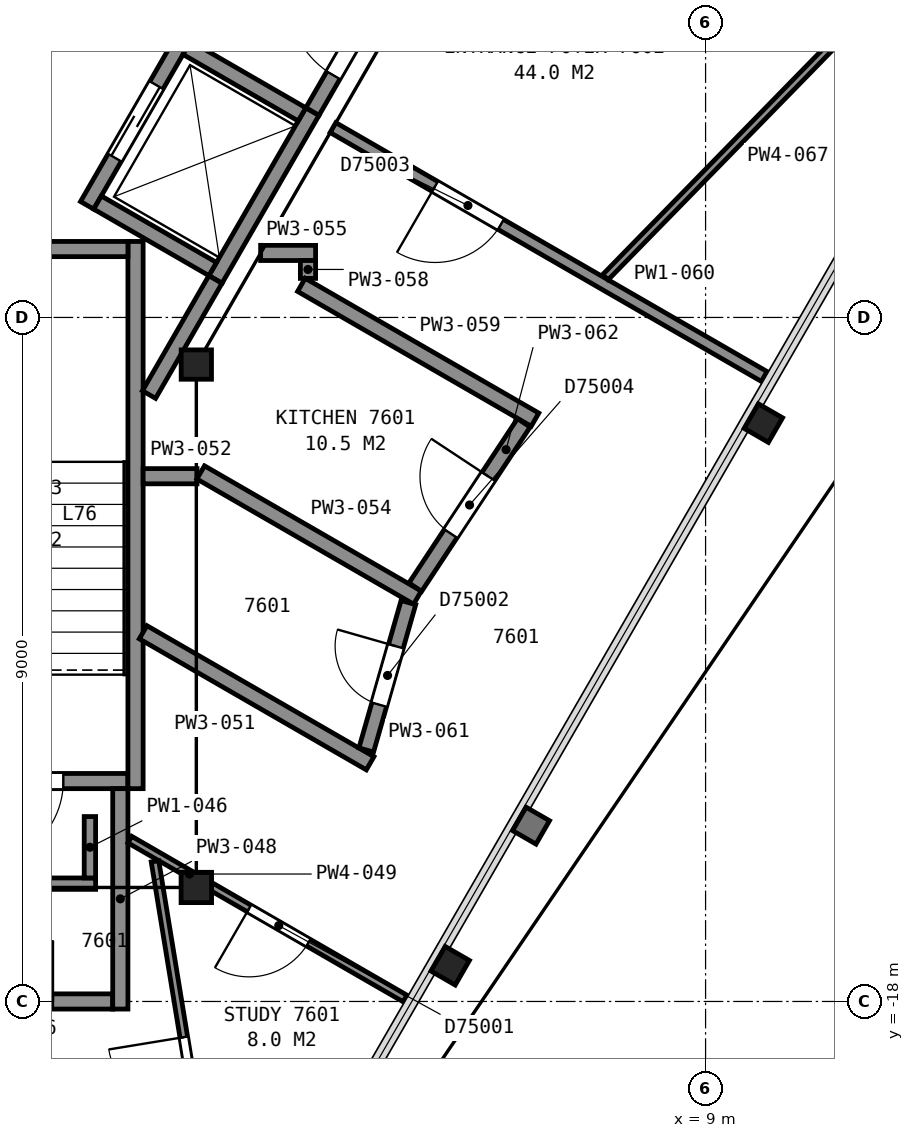
"""IFC4 building model, lengths in metres.
Left out: names, types, materials, properties, quantities, classifications, styles, units other than length and angle.
Written with IfcOpenShell. Run it as: python <this file> out.ifc"""

import sys

from ifc_helpers import new_model, si_unit, direction, frame, frame_2d, origin, origin_2d, place, context, subcontext, project, spatial, rectangle, i_section, extrude, element, fill, save


model = new_model("IFC4")
c1 = context("Model", 3, precision=1e-05, world=origin(), true_north=direction((0.0, 1.0)))
c2 = subcontext(c1, "Body", "Model", "MODEL_VIEW")
j1 = project(units=[si_unit("LENGTHUNIT", "METRE"), si_unit("PLANEANGLEUNIT", "RADIAN")], contexts=[c1])
p1 = place(None, origin())
s1 = spatial("IfcSite", under=j1, at=p1, CompositionType="ELEMENT")
p2 = place(p1, origin())
s2 = spatial("IfcBuilding", under=s1, at=p2, CompositionType="ELEMENT")
p3 = place(p2, frame((0.0, 0.0, 301.0)))
s3 = spatial("IfcBuildingStorey", under=s2, at=p3, CompositionType="ELEMENT", Elevation=301.0)
p4 = place(p3, frame((5.64, -17.53, 0.0), z_axis=(0.0, 0.0, 1.0), x_axis=(-0.5, -0.866025403784, 0.0)))
e1 = element("IfcColumn", 1, at=p4, inside=s3, PredefinedType="COLUMN", context=c2, shape_type="SweptSolid", body=[
    extrude(i_section(OverallWidth=0.373, OverallDepth=0.368, WebThickness=0.015, FlangeThickness=0.024, FilletRadius=0.015, at=origin_2d()), origin(), (0.0, 0.0, 1.0), 3.645),
])
p5 = place(p3, frame((9.76, -10.39, 0.0), z_axis=(0.0, 0.0, 1.0), x_axis=(-0.5, -0.866025403784, 0.0)))
e2 = element("IfcColumn", 2, at=p5, inside=s3, PredefinedType="COLUMN", context=c2, shape_type="SweptSolid", body=[
    extrude(i_section(OverallWidth=0.373, OverallDepth=0.368, WebThickness=0.015, FlangeThickness=0.024, FilletRadius=0.015, at=origin_2d()), origin(), (0.0, 0.0, 1.0), 3.655),
])
p6 = place(p3, frame((2.3, -16.5, 0.0), z_axis=(0.0, 0.0, 1.0), x_axis=(-1.0, 0.0, 0.0)))
e3 = element("IfcColumn", 3, at=p6, inside=s3, PredefinedType="COLUMN", context=c2, shape_type="SweptSolid", body=[
    extrude(i_section(OverallWidth=0.401, OverallDepth=0.399, WebThickness=0.025, FlangeThickness=0.04, FilletRadius=0.015, at=origin_2d()), origin(), (0.0, 0.0, 1.0), 3.7),
])
p7 = place(p3, frame((2.3, -9.62, 0.0), z_axis=(0.0, 0.0, 1.0), x_axis=(1.0, 0.0, 0.0)))
e4 = element("IfcColumn", 4, at=p7, inside=s3, PredefinedType="COLUMN", context=c2, shape_type="SweptSolid", body=[
    extrude(i_section(OverallWidth=0.399, OverallDepth=0.386, WebThickness=0.021, FlangeThickness=0.033, FilletRadius=0.015, at=origin_2d()), origin(), (0.0, 0.0, 1.0), 3.7),
])
p8 = place(p3, frame((-1.4, -15.1, 0.0), z_axis=(0.0, 0.0, 1.0), x_axis=(1.0, 0.0, 0.0)))
e5 = element("IfcWall", 5, at=p8, inside=s3, PredefinedType="PARTITIONING", context=c2, shape_type="SweptSolid", body=[
    extrude(rectangle(XDim=2.8, YDim=0.2, at=frame_2d((1.4, 0.0))), origin(), (0.0, 0.0, 1.0), 3.45),
])
p9 = place(p8, frame((0.85, 0.0, 0.0)))
e6 = element("IfcOpeningElement", 6, at=p9, cuts=e5, PredefinedType="OPENING", context=c2, shape_type="SweptSolid", body=[
    extrude(rectangle(XDim=1.1, YDim=2.1, at=frame_2d((0.55, 1.05))), frame((0.0, 0.11, 0.0), z_axis=(0.0, -1.0, 0.0), x_axis=(1.0, 0.0, 0.0)), (0.0, 0.0, 1.0), 0.22),
])
p10 = place(p3, frame((1.5, -8.0, 0.0), z_axis=(0.0, 0.0, 1.0), x_axis=(0.0, -1.0, 0.0)))
e7 = element("IfcWall", 7, at=p10, inside=s3, PredefinedType="PARTITIONING", context=c2, shape_type="SweptSolid", body=[
    extrude(rectangle(XDim=7.2, YDim=0.2, at=frame_2d((3.6, 0.0))), origin(), (0.0, 0.0, 1.0), 3.45),
])
p11 = place(p3, frame((-1.4, -8.1, 0.0), z_axis=(0.0, 0.0, 1.0), x_axis=(1.0, 0.0, 0.0)))
e8 = element("IfcWall", 8, at=p11, inside=s3, PredefinedType="PARTITIONING", context=c2, shape_type="SweptSolid", body=[
    extrude(rectangle(XDim=2.8, YDim=0.2, at=frame_2d((1.4, 0.0))), origin(), (0.0, 0.0, 1.0), 3.45),
])
p12 = place(p3, frame((2.552, -8.5, 0.0), z_axis=(0.0, 0.0, 1.0), x_axis=(0.499990435942, 0.866030925526, 0.0)))
e9 = element("IfcWall", 9, at=p12, inside=s3, PredefinedType="PARTITIONING", context=c2, shape_type="SweptSolid", body=[
    extrude(rectangle(XDim=2.55, YDim=0.2, at=frame_2d((1.275, 0.0))), origin(), (0.0, 0.0, 1.0), 3.7),
])
p13 = place(p3, frame((0.863, -7.525, 0.0), z_axis=(0.0, 0.0, 1.0), x_axis=(0.499990435942, 0.866030925526, 0.0)))
e10 = element("IfcWall", 10, at=p13, inside=s3, PredefinedType="PARTITIONING", context=c2, shape_type="SweptSolid", body=[
    extrude(rectangle(XDim=2.55, YDim=0.2, at=frame_2d((1.275, 0.0))), origin(), (0.0, 0.0, 1.0), 3.7),
])
p14 = place(p13, frame((0.725, 0.0, 0.0)))
e11 = element("IfcOpeningElement", 11, at=p14, cuts=e10, PredefinedType="OPENING", context=c2, shape_type="SweptSolid", body=[
    extrude(rectangle(XDim=1.1, YDim=2.1, at=frame_2d((0.55, 1.05))), frame((0.0, 0.11, 0.0), z_axis=(0.0, -1.0, 0.0), x_axis=(1.0, 0.0, 0.0)), (0.0, 0.0, 1.0), 0.22),
])
for number, where, z_axis, x_axis in (
    (12, (3.69, -6.328, 0.0), (0.0, 0.0, 1.0), (-0.866, 0.5, 0.0)),
    (13, (2.515, -8.363, 0.0), (0.0, 0.0, 1.0), (-0.866, 0.5, 0.0)),
):
    element("IfcWall", number, at=place(p3, frame(where, z_axis=z_axis, x_axis=x_axis)), inside=s3, PredefinedType="PARTITIONING", context=c2, shape_type="SweptSolid", body=[
        extrude(rectangle(XDim=1.75, YDim=0.2, at=frame_2d((0.875, 0.0))), origin(), (0.0, 0.0, 1.0), 3.7),
    ])
p15 = place(p3, frame((1.677, -10.015, 0.0), z_axis=(0.0, 0.0, 1.0), x_axis=(0.49983532306, 0.866120459187, 0.0)))
e14 = element("IfcWall", 14, at=p15, inside=s3, PredefinedType="PARTITIONING", context=c2, shape_type="SweptSolid", body=[
    extrude(rectangle(XDim=1.748, YDim=0.2, at=frame_2d((0.874, 0.0))), origin(), (0.0, 0.0, 1.0), 3.45),
])
p16 = place(p3, frame((3.828, -6.29, 0.0), z_axis=(0.0, 0.0, 1.0), x_axis=(0.499979739078, 0.866037101117, 0.0)))
e15 = element("IfcWall", 15, at=p16, inside=s3, PredefinedType="PARTITIONING", context=c2, shape_type="SweptSolid", body=[
    extrude(rectangle(XDim=11.363, YDim=0.2, at=frame_2d((5.681, 0.0))), origin(), (0.0, 0.0, 1.0), 3.45),
])
p17 = place(p16, frame((0.55, 0.0, 0.0)))
e16 = element("IfcOpeningElement", 16, at=p17, cuts=e15, PredefinedType="OPENING", context=c2, shape_type="SweptSolid", body=[
    extrude(rectangle(XDim=1.2, YDim=2.1, at=frame_2d((0.6, 1.05))), frame((0.0, 0.11, 0.0), z_axis=(0.0, -1.0, 0.0), x_axis=(1.0, 0.0, 0.0)), (0.0, 0.0, 1.0), 0.22),
])
p18 = place(p3, frame((-1.37, -16.45, 0.0), z_axis=(0.0, 0.0, 1.0), x_axis=(1.0, 0.0, 0.0)))
e17 = element("IfcWall", 17, at=p18, inside=s3, PredefinedType="PARTITIONING", context=c2, shape_type="SweptSolid", body=[
    extrude(rectangle(XDim=2.345, YDim=0.15, at=frame_2d((1.173, 0.0))), origin(), (0.0, 0.0, 1.0), 2.723),
])
p19 = place(p3, frame((-1.211, -18.0, 0.0), z_axis=(0.0, 0.0, 1.0), x_axis=(1.0, 0.0, 0.0)))
e18 = element("IfcWall", 18, at=p19, inside=s3, PredefinedType="PARTITIONING", context=c2, shape_type="SweptSolid", body=[
    extrude(rectangle(XDim=2.411, YDim=0.2, at=frame_2d((1.206, 0.0))), origin(), (0.0, 0.0, 1.0), 2.723),
])
p20 = place(p19, frame((0.825, 0.0, 0.0)))
e19 = element("IfcOpeningElement", 19, at=p20, cuts=e18, PredefinedType="OPENING", context=c2, shape_type="SweptSolid", body=[
    extrude(rectangle(XDim=0.8, YDim=2.1, at=frame_2d((0.4, 1.05))), frame((0.0, 0.11, 0.0), z_axis=(0.0, -1.0, 0.0), x_axis=(1.0, 0.0, 0.0)), (0.0, 0.0, 1.0), 0.22),
])
p21 = place(p3, frame((0.9, -16.375, 0.0), z_axis=(0.0, 0.0, 1.0), x_axis=(0.0, 1.0, 0.0)))
e20 = element("IfcWall", 20, at=p21, inside=s3, PredefinedType="PARTITIONING", context=c2, shape_type="SweptSolid", body=[
    extrude(rectangle(XDim=0.808, YDim=0.15, at=frame_2d((0.404, 0.0))), origin(), (0.0, 0.0, 1.0), 2.723),
])
p22 = place(p3, frame((1.3, -18.1, 0.0), z_axis=(0.0, 0.0, 1.0), x_axis=(0.0, 1.0, 0.0)))
e21 = element("IfcWall", 21, at=p22, inside=s3, PredefinedType="PARTITIONING", context=c2, shape_type="SweptSolid", body=[
    extrude(rectangle(XDim=2.9, YDim=0.2, at=frame_2d((1.45, 0.0))), origin(), (0.0, 0.0, 1.0), 2.723),
])
p23 = place(p3, frame((5.047, -17.961, 0.0), z_axis=(0.0, 0.0, 1.0), x_axis=(-0.866050460131, 0.499956598623, 0.0)))
e22 = element("IfcWall", 22, at=p23, inside=s3, PredefinedType="PARTITIONING", context=c2, shape_type="SweptSolid", body=[
    extrude(rectangle(XDim=4.182, YDim=0.1, at=frame_2d((2.091, 0.0))), origin(), (0.0, 0.0, 1.0), 2.723),
])
p24 = place(p23, frame((1.469, 0.0, 0.0)))
e23 = element("IfcOpeningElement", 23, at=p24, cuts=e22, PredefinedType="OPENING", context=c2, shape_type="SweptSolid", body=[
    extrude(rectangle(XDim=0.9, YDim=2.1, at=frame_2d((0.45, 1.05))), frame((0.0, 0.06, 0.0), z_axis=(0.0, -1.0, 0.0), x_axis=(1.0, 0.0, 0.0)), (0.0, 0.0, 1.0), 0.12),
])
p25 = place(p3, frame((1.6, -13.142, 0.0), z_axis=(0.0, 0.0, 1.0), x_axis=(0.866078307516, -0.499908356852, 0.0)))
e24 = element("IfcWall", 24, at=p25, inside=s3, PredefinedType="PARTITIONING", context=c2, shape_type="SweptSolid", body=[
    extrude(rectangle(XDim=3.448, YDim=0.2, at=frame_2d((1.724, 0.0))), origin(), (0.0, 0.0, 1.0), 2.723),
])
p26 = place(p3, frame((1.6, -11.089, 0.0), z_axis=(0.0, 0.0, 1.0), x_axis=(1.0, 0.0, 0.0)))
e25 = element("IfcWall", 25, at=p26, inside=s3, PredefinedType="PARTITIONING", context=c2, shape_type="SweptSolid", body=[
    extrude(rectangle(XDim=0.709, YDim=0.2, at=frame_2d((0.354, 0.0))), origin(), (0.0, 0.0, 1.0), 2.723),
])
p27 = place(p3, frame((2.721, -22.048, 0.0), z_axis=(0.0, 0.0, 1.0), x_axis=(-0.161659467857, 0.98684660229, 0.0)))
e26 = element("IfcWall", 26, at=p27, inside=s3, PredefinedType="PARTITIONING", context=c2, shape_type="SweptSolid", body=[
    extrude(rectangle(XDim=5.97, YDim=0.1, at=frame_2d((2.985, 0.0))), origin(), (0.0, 0.0, 1.0), 2.723),
])
p28 = place(p27, frame((2.625, 0.0, 0.0)))
e27 = element("IfcOpeningElement", 27, at=p28, cuts=e26, PredefinedType="OPENING", context=c2, shape_type="SweptSolid", body=[
    extrude(rectangle(XDim=1.0, YDim=2.1, at=frame_2d((0.5, 1.05))), frame((0.0, 0.06, 0.0), z_axis=(0.0, -1.0, 0.0), x_axis=(1.0, 0.0, 0.0)), (0.0, 0.0, 1.0), 0.12),
])
p29 = place(p3, frame((2.357, -11.039, 0.0), z_axis=(0.0, 0.0, 1.0), x_axis=(0.865999185644, -0.500045408402, 0.0)))
e28 = element("IfcWall", 28, at=p29, inside=s3, PredefinedType="PARTITIONING", context=c2, shape_type="SweptSolid", body=[
    extrude(rectangle(XDim=3.294, YDim=0.2, at=frame_2d((1.647, 0.0))), origin(), (0.0, 0.0, 1.0), 2.723),
])
p30 = place(p3, frame((3.146, -8.151, 0.0), z_axis=(0.0, 0.0, 1.0), x_axis=(1.0, 0.0, 0.0)))
e29 = element("IfcWall", 29, at=p30, inside=s3, PredefinedType="PARTITIONING", context=c2, shape_type="SweptSolid", body=[
    extrude(rectangle(XDim=0.723, YDim=0.2, at=frame_2d((0.361, 0.0))), origin(), (0.0, 0.0, 1.0), 2.723),
])
p31 = place(p3, frame((3.769, -8.486, 0.0), z_axis=(0.0, 0.0, 1.0), x_axis=(0.0, 1.0, 0.0)))
e30 = element("IfcWall", 30, at=p31, inside=s3, PredefinedType="PARTITIONING", context=c2, shape_type="SweptSolid", body=[
    extrude(rectangle(XDim=0.235, YDim=0.2, at=frame_2d((0.118, 0.0))), origin(), (0.0, 0.0, 1.0), 2.723),
])
p32 = place(p3, frame((3.682, -8.571, 0.0), z_axis=(0.0, 0.0, 1.0), x_axis=(0.866075604562, -0.499913039621, 0.0)))
e31 = element("IfcWall", 31, at=p32, inside=s3, PredefinedType="PARTITIONING", context=c2, shape_type="SweptSolid", body=[
    extrude(rectangle(XDim=3.549, YDim=0.2, at=frame_2d((1.774, 0.0))), origin(), (0.0, 0.0, 1.0), 2.723),
])
p33 = place(p3, frame((9.772, -9.777, 0.0), z_axis=(0.0, 0.0, 1.0), x_axis=(-0.866083818164, 0.499898809675, 0.0)))
e32 = element("IfcWall", 32, at=p33, inside=s3, PredefinedType="PARTITIONING", context=c2, shape_type="SweptSolid", body=[
    extrude(rectangle(XDim=6.551, YDim=0.15, at=frame_2d((3.275, 0.0))), origin(), (0.0, 0.0, 1.0), 2.723),
])
p34 = place(p33, frame((4.001, 0.0, 0.0)))
e33 = element("IfcOpeningElement", 33, at=p34, cuts=e32, PredefinedType="OPENING", context=c2, shape_type="SweptSolid", body=[
    extrude(rectangle(XDim=1.0, YDim=2.1, at=frame_2d((0.5, 1.05))), frame((0.0, 0.085, 0.0), z_axis=(0.0, -1.0, 0.0), x_axis=(1.0, 0.0, 0.0)), (0.0, 0.0, 1.0), 0.17),
])
p35 = place(p3, frame((4.536, -14.691, 0.0), z_axis=(0.0, 0.0, 1.0), x_axis=(0.27486499374, 0.961482831472, 0.0)))
e34 = element("IfcWall", 34, at=p35, inside=s3, PredefinedType="PARTITIONING", context=c2, shape_type="SweptSolid", body=[
    extrude(rectangle(XDim=2.017, YDim=0.2, at=frame_2d((1.009, 0.0))), origin(), (0.0, 0.0, 1.0), 2.723),
])
p36 = place(p35, frame((0.62, 0.0, 0.0)))
e35 = element("IfcOpeningElement", 35, at=p36, cuts=e34, PredefinedType="OPENING", context=c2, shape_type="SweptSolid", body=[
    extrude(rectangle(XDim=0.8, YDim=2.1, at=frame_2d((0.4, 1.05))), frame((0.0, 0.11, 0.0), z_axis=(0.0, -1.0, 0.0), x_axis=(1.0, 0.0, 0.0)), (0.0, 0.0, 1.0), 0.22),
])
p37 = place(p3, frame((5.181, -12.548, 0.0), z_axis=(0.0, 0.0, 1.0), x_axis=(0.55106277299, 0.834463792039, 0.0)))
e36 = element("IfcWall", 36, at=p37, inside=s3, PredefinedType="PARTITIONING", context=c2, shape_type="SweptSolid", body=[
    extrude(rectangle(XDim=2.59, YDim=0.2, at=frame_2d((1.295, 0.0))), origin(), (0.0, 0.0, 1.0), 2.723),
])
p38 = place(p37, frame((0.845, 0.0, 0.0)))
e37 = element("IfcOpeningElement", 37, at=p38, cuts=e36, PredefinedType="OPENING", context=c2, shape_type="SweptSolid", body=[
    extrude(rectangle(XDim=0.9, YDim=2.1, at=frame_2d((0.45, 1.05))), frame((0.0, 0.11, 0.0), z_axis=(0.0, -1.0, 0.0), x_axis=(1.0, 0.0, 0.0)), (0.0, 0.0, 1.0), 0.22),
])
p39 = place(p3, frame((7.682, -8.47, 0.0), z_axis=(0.0, 0.0, 1.0), x_axis=(0.698777378461, 0.715339203002, 0.0)))
e38 = element("IfcWall", 38, at=p39, inside=s3, PredefinedType="PARTITIONING", context=c2, shape_type="SweptSolid", body=[
    extrude(rectangle(XDim=4.452, YDim=0.1, at=frame_2d((2.226, 0.0))), origin(), (0.0, 0.0, 1.0), 2.723),
])
p40 = place(p9, origin())
e39 = element("IfcDoor", 39, at=p40, inside=s3, OperationType="SINGLE_SWING_LEFT", PredefinedType="DOOR", context=c2, shape_type="SweptSolid", body=[
    extrude(rectangle(XDim=1.1, YDim=2.1, at=frame_2d((0.55, 1.05))), frame((0.0, 0.025, 0.0), z_axis=(0.0, -1.0, 0.0), x_axis=(1.0, 0.0, 0.0)), (0.0, 0.0, 1.0), 0.05),
])
fill(e6, e39)
p41 = place(p14, origin())
e40 = element("IfcDoor", 40, at=p41, inside=s3, OperationType="SLIDING_TO_LEFT", PredefinedType="DOOR", context=c2, shape_type="SweptSolid", body=[
    extrude(rectangle(XDim=1.1, YDim=2.1, at=frame_2d((0.55, 1.05))), frame((0.0, 0.025, 0.0), z_axis=(0.0, -1.0, 0.0), x_axis=(1.0, 0.0, 0.0)), (0.0, 0.0, 1.0), 0.05),
])
fill(e11, e40)
p42 = place(p17, origin())
e41 = element("IfcDoor", 41, at=p42, inside=s3, OperationType="SINGLE_SWING_RIGHT", PredefinedType="DOOR", context=c2, shape_type="SweptSolid", body=[
    extrude(rectangle(XDim=1.2, YDim=2.1, at=frame_2d((0.6, 1.05))), frame((0.0, 0.025, 0.0), z_axis=(0.0, -1.0, 0.0), x_axis=(1.0, 0.0, 0.0)), (0.0, 0.0, 1.0), 0.05),
])
fill(e16, e41)
p43 = place(p20, origin())
e42 = element("IfcDoor", 42, at=p43, inside=s3, OperationType="SINGLE_SWING_RIGHT", PredefinedType="DOOR", context=c2, shape_type="SweptSolid", body=[
    extrude(rectangle(XDim=0.8, YDim=2.1, at=frame_2d((0.4, 1.05))), frame((0.0, 0.025, 0.0), z_axis=(0.0, -1.0, 0.0), x_axis=(1.0, 0.0, 0.0)), (0.0, 0.0, 1.0), 0.05),
])
fill(e19, e42)
p44 = place(p24, origin())
e43 = element("IfcDoor", 43, at=p44, inside=s3, OperationType="SINGLE_SWING_RIGHT", PredefinedType="DOOR", context=c2, shape_type="SweptSolid", body=[
    extrude(rectangle(XDim=0.9, YDim=2.1, at=frame_2d((0.45, 1.05))), frame((0.0, 0.025, 0.0), z_axis=(0.0, -1.0, 0.0), x_axis=(1.0, 0.0, 0.0)), (0.0, 0.0, 1.0), 0.05),
])
fill(e23, e43)
p45 = place(p28, origin())
e44 = element("IfcDoor", 44, at=p45, inside=s3, OperationType="SINGLE_SWING_RIGHT", PredefinedType="DOOR", context=c2, shape_type="SweptSolid", body=[
    extrude(rectangle(XDim=1.0, YDim=2.1, at=frame_2d((0.5, 1.05))), frame((0.0, 0.025, 0.0), z_axis=(0.0, -1.0, 0.0), x_axis=(1.0, 0.0, 0.0)), (0.0, 0.0, 1.0), 0.05),
])
fill(e27, e44)
p46 = place(p34, origin())
e45 = element("IfcDoor", 45, at=p46, inside=s3, OperationType="SINGLE_SWING_RIGHT", PredefinedType="DOOR", context=c2, shape_type="SweptSolid", body=[
    extrude(rectangle(XDim=1.0, YDim=2.1, at=frame_2d((0.5, 1.05))), frame((0.0, 0.025, 0.0), z_axis=(0.0, -1.0, 0.0), x_axis=(1.0, 0.0, 0.0)), (0.0, 0.0, 1.0), 0.05),
])
fill(e33, e45)
p47 = place(p36, origin())
e46 = element("IfcDoor", 46, at=p47, inside=s3, OperationType="SINGLE_SWING_RIGHT", PredefinedType="DOOR", context=c2, shape_type="SweptSolid", body=[
    extrude(rectangle(XDim=0.8, YDim=2.1, at=frame_2d((0.4, 1.05))), frame((0.0, 0.025, 0.0), z_axis=(0.0, -1.0, 0.0), x_axis=(1.0, 0.0, 0.0)), (0.0, 0.0, 1.0), 0.05),
])
fill(e35, e46)
p48 = place(p38, origin())
e47 = element("IfcDoor", 47, at=p48, inside=s3, OperationType="SINGLE_SWING_RIGHT", PredefinedType="DOOR", context=c2, shape_type="SweptSolid", body=[
    extrude(rectangle(XDim=0.9, YDim=2.1, at=frame_2d((0.45, 1.05))), frame((0.0, 0.025, 0.0), z_axis=(0.0, -1.0, 0.0), x_axis=(1.0, 0.0, 0.0)), (0.0, 0.0, 1.0), 0.05),
])
fill(e37, e47)
save(model, sys.argv[1])
